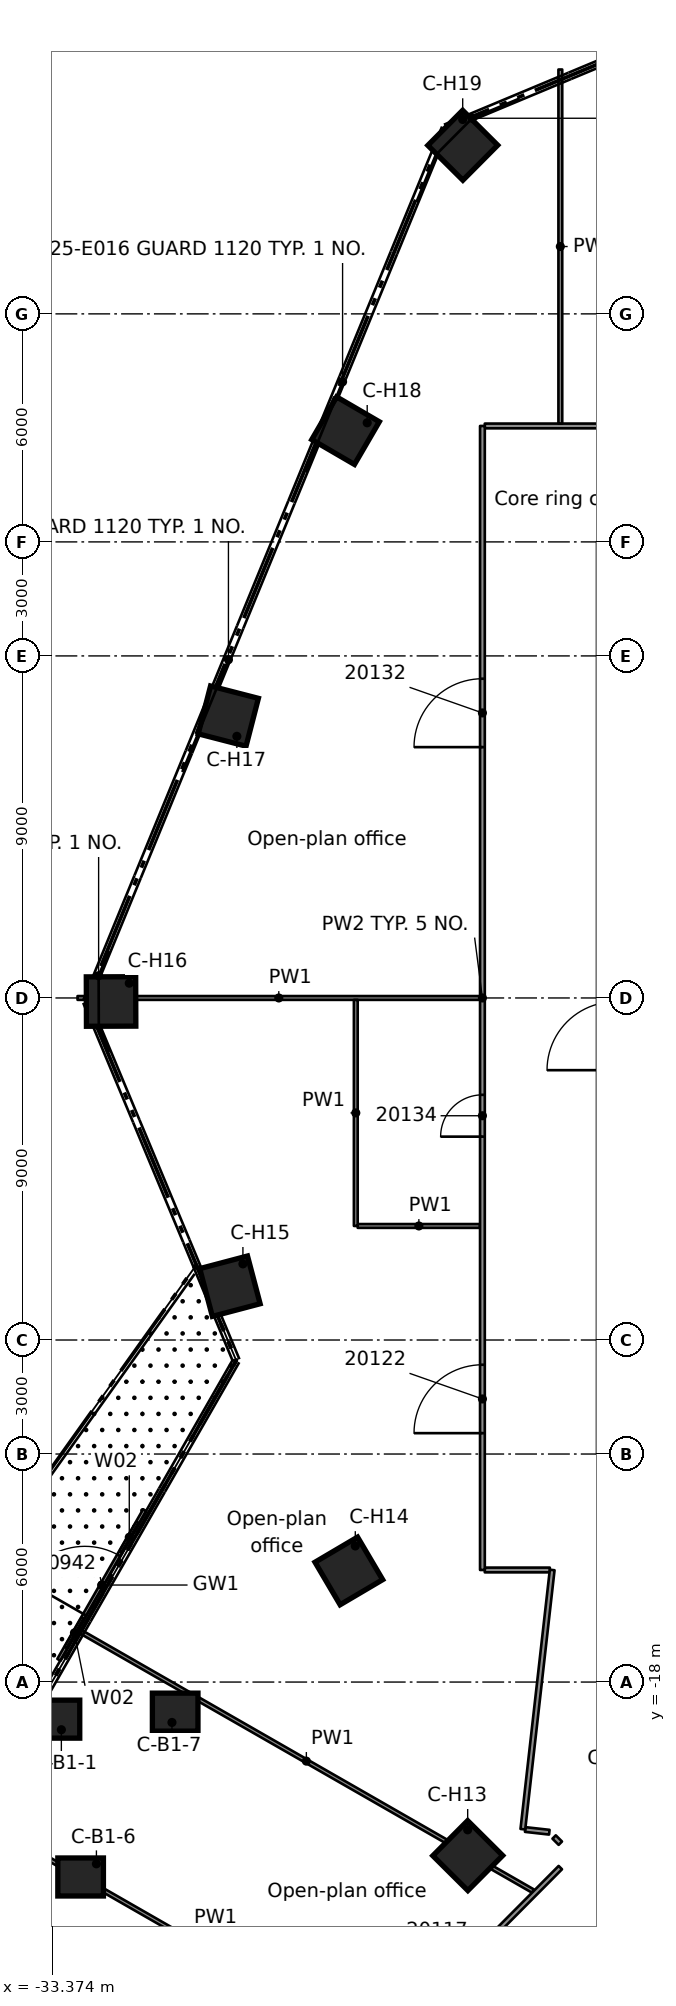
"""IFC4 building model, lengths in metres.
Left out: names, types, materials, properties, quantities, classifications, styles, units other than length and angle.
Written with IfcOpenShell. Run it as: python <this file> out.ifc"""

import sys

from ifc_helpers import new_model, si_unit, direction, frame, frame_2d, origin, origin_2d, place, context, subcontext, project, spatial, rectangle, extrude, element, fill, save


model = new_model("IFC4")
c1 = context("Model", 3, precision=1e-05, world=origin(), true_north=direction((0.0, 1.0)))
c2 = subcontext(c1, "Body", "Model", "MODEL_VIEW")
j1 = project(units=[si_unit("LENGTHUNIT", "METRE"), si_unit("PLANEANGLEUNIT", "RADIAN")], contexts=[c1])
p1 = place(None, origin())
s1 = spatial("IfcSite", under=j1, at=p1, CompositionType="ELEMENT")
p2 = place(p1, origin())
s2 = spatial("IfcBuilding", under=s1, at=p2, CompositionType="ELEMENT")
p3 = place(p2, frame((0.0, 0.0, 102.2)))
s3 = spatial("IfcBuildingStorey", under=s2, at=p3, CompositionType="ELEMENT", Elevation=102.2)
for number, where, z_axis, x_axis in (
    (1, (-33.246, -18.976, 0.0), (0.0, 0.0, 1.0), (1.0, 0.0, 0.0)),
    (2, (-32.623, -23.129, 0.0), (0.0, 0.0, 1.0), (1.0, 0.0, 0.0)),
    (3, (-30.135, -18.792, 0.0), (0.0, 0.0, 1.0), (1.0, 0.0, 0.0)),
):
    element("IfcColumn", number, at=place(p3, frame(where, z_axis=z_axis, x_axis=x_axis)), inside=s3, PredefinedType="COLUMN", context=c2, shape_type="SweptSolid", body=[
        extrude(rectangle(XDim=1.2, YDim=1.0, at=origin_2d()), origin(), (0.0, 0.0, 1.0), 3.5),
    ])
for number, where, z_axis, x_axis in (
    (4, (-22.436, -22.567, 0.0), (0.0, 0.0, 1.0), (-0.705, -0.709, 0.0)),
    (5, (-25.565, -15.076, 0.0), (0.0, 0.0, 1.0), (-0.861, -0.508, 0.0)),
    (6, (-28.694, -7.584, 0.0), (0.0, 0.0, 1.0), (-0.967, -0.256, 0.0)),
    (7, (-31.822, -0.093, 0.0), (0.0, 0.0, 1.0), (-1.0, -0.003, 0.0)),
    (8, (-28.737, 7.417, 0.0), (0.0, 0.0, 1.0), (-0.968, 0.25, 0.0)),
    (9, (-25.652, 14.927, 0.0), (0.0, 0.0, 1.0), (-0.864, 0.503, 0.0)),
    (10, (-22.567, 22.436, 0.0), (0.0, 0.0, 1.0), (-0.709, 0.705, 0.0)),
):
    element("IfcColumn", number, at=place(p3, frame(where, z_axis=z_axis, x_axis=x_axis)), inside=s3, PredefinedType="COLUMN", context=c2, shape_type="SweptSolid", body=[
        extrude(rectangle(XDim=1.3, YDim=1.3, at=origin_2d()), origin(), (0.0, 0.0, 1.0), 3.5),
    ])
p4 = place(p3, frame((-33.193, -17.416, 0.0), z_axis=(0.0, 0.0, 1.0), x_axis=(0.497482354019, 0.86747409612, 0.0)))
e11 = element("IfcWall", 11, at=p4, inside=s3, PredefinedType="STANDARD", context=c2, shape_type="SweptSolid", body=[
    extrude(rectangle(XDim=4.539, YDim=0.1, at=frame_2d((2.269, 0.0))), origin(), (0.0, 0.0, 1.0), 3.1),
])
p5 = place(p4, frame((1.369, 0.0, 0.0)))
e12 = element("IfcOpeningElement", 12, at=p5, cuts=e11, PredefinedType="OPENING", context=c2, shape_type="SweptSolid", body=[
    extrude(rectangle(XDim=1.8, YDim=2.4, at=frame_2d((0.9, 1.2))), frame((0.0, 0.06, 0.0), z_axis=(0.0, -1.0, 0.0), x_axis=(1.0, 0.0, 0.0)), (0.0, 0.0, 1.0), 0.12),
])
p6 = place(p4, frame((0.369, 0.0, 0.0)))
e13 = element("IfcOpeningElement", 13, at=p6, cuts=e11, PredefinedType="OPENING", context=c2, shape_type="SweptSolid", body=[
    extrude(rectangle(XDim=0.9, YDim=2.4, at=frame_2d((0.45, 1.2))), frame((0.0, 0.06, 0.0), z_axis=(0.0, -1.0, 0.0), x_axis=(1.0, 0.0, 0.0)), (0.0, 0.0, 1.0), 0.12),
])
p7 = place(p4, frame((3.269, 0.0, 0.0)))
e14 = element("IfcOpeningElement", 14, at=p7, cuts=e11, PredefinedType="OPENING", context=c2, shape_type="SweptSolid", body=[
    extrude(rectangle(XDim=0.9, YDim=2.4, at=frame_2d((0.45, 1.2))), frame((0.0, 0.06, 0.0), z_axis=(0.0, -1.0, 0.0), x_axis=(1.0, 0.0, 0.0)), (0.0, 0.0, 1.0), 0.12),
])
p8 = place(p3, frame((-20.163, -22.077, 0.0), z_axis=(0.0, 0.0, 1.0), x_axis=(0.707106781187, -0.707106781187, 0.0)))
e15 = element("IfcWall", 15, at=p8, inside=s3, PredefinedType="PARTITIONING", context=c2, shape_type="SweptSolid", body=[
    extrude(rectangle(XDim=0.231, YDim=0.125, at=frame_2d((0.115, 0.0))), origin(), (0.0, 0.0, 1.0), 3.08),
])
p9 = place(p3, frame((-35.624, -21.415, 0.0), z_axis=(0.0, 0.0, 1.0), x_axis=(0.867457713736, -0.497510919358, 0.0)))
e16 = element("IfcWall", 16, at=p9, inside=s3, PredefinedType="PARTITIONING", context=c2, shape_type="SweptSolid", body=[
    extrude(rectangle(XDim=13.523, YDim=0.1, at=frame_2d((6.762, 0.0))), origin(), (0.0, 0.0, 1.0), 3.08),
])
p10 = place(p3, frame((-32.645, -16.662, 0.0), z_axis=(0.0, 0.0, 1.0), x_axis=(0.867516428304, -0.497408530911, 0.0)))
e17 = element("IfcWall", 17, at=p10, inside=s3, PredefinedType="PARTITIONING", context=c2, shape_type="SweptSolid", body=[
    extrude(rectangle(XDim=13.745, YDim=0.1, at=frame_2d((6.873, 0.0))), origin(), (0.0, 0.0, 1.0), 3.08),
])
p11 = place(p3, frame((-20.924, -21.88, 0.0), z_axis=(0.0, 0.0, 1.0), x_axis=(0.993780638981, -0.111355473987, 0.0)))
e18 = element("IfcWall", 18, at=p11, inside=s3, PredefinedType="PARTITIONING", context=c2, shape_type="SweptSolid", body=[
    extrude(rectangle(XDim=0.638, YDim=0.125, at=frame_2d((0.319, 0.0))), origin(), (0.0, 0.0, 1.0), 3.08),
])
p12 = place(p3, frame((-21.988, -15.051, 0.0), z_axis=(0.0, 0.0, 1.0), x_axis=(1.0, 0.0, 0.0)))
e19 = element("IfcWall", 19, at=p12, inside=s3, PredefinedType="PARTITIONING", context=c2, shape_type="SweptSolid", body=[
    extrude(rectangle(XDim=1.712, YDim=0.125, at=frame_2d((0.856, 0.0))), origin(), (0.0, 0.0, 1.0), 3.08),
])
p13 = place(p3, frame((-25.332, -5.999, 0.0), z_axis=(0.0, 0.0, 1.0), x_axis=(1.0, 0.0, 0.0)))
e20 = element("IfcWall", 20, at=p13, inside=s3, PredefinedType="PARTITIONING", context=c2, shape_type="SweptSolid", body=[
    extrude(rectangle(XDim=3.219, YDim=0.1, at=frame_2d((1.609, 0.0))), origin(), (0.0, 0.0, 1.0), 3.08),
])
p14 = place(p3, frame((-32.704, 0.0, 0.0), z_axis=(0.0, 0.0, 1.0), x_axis=(1.0, 0.0, 0.0)))
e21 = element("IfcWall", 21, at=p14, inside=s3, PredefinedType="PARTITIONING", context=c2, shape_type="SweptSolid", body=[
    extrude(rectangle(XDim=10.591, YDim=0.1, at=frame_2d((5.295, 0.0))), origin(), (0.0, 0.0, 1.0), 3.08),
])
p15 = place(p3, frame((-21.988, 15.051, 0.0), z_axis=(0.0, 0.0, 1.0), x_axis=(1.0, 0.0, 0.0)))
e22 = element("IfcWall", 22, at=p15, inside=s3, PredefinedType="PARTITIONING", context=c2, shape_type="SweptSolid", body=[
    extrude(rectangle(XDim=10.997, YDim=0.125, at=frame_2d((5.499, 0.0))), origin(), (0.0, 0.0, 1.0), 3.08),
])
p16 = place(p15, frame((5.587, 0.0, 0.0)))
e23 = element("IfcOpeningElement", 23, at=p16, cuts=e22, PredefinedType="OPENING", context=c2, shape_type="SweptSolid", body=[
    extrude(rectangle(XDim=1.8, YDim=2.1, at=frame_2d((0.9, 1.05))), frame((0.0, 0.073, 0.0), z_axis=(0.0, -1.0, 0.0), x_axis=(1.0, 0.0, 0.0)), (0.0, 0.0, 1.0), 0.145),
])
p17 = place(p3, frame((-20.0, -22.882, 0.0), z_axis=(0.0, 0.0, 1.0), x_axis=(-0.705070089301, -0.709137623578, 0.0)))
e24 = element("IfcWall", 24, at=p17, inside=s3, PredefinedType="PARTITIONING", context=c2, shape_type="SweptSolid", body=[
    extrude(rectangle(XDim=2.641, YDim=0.125, at=frame_2d((1.32, 0.0))), origin(), (0.0, 0.0, 1.0), 3.08),
])
p18 = place(p3, frame((-16.8, -23.128, 0.0), z_axis=(0.0, 0.0, 1.0), x_axis=(-0.496846554385, -0.867838407422, 0.0)))
e25 = element("IfcWall", 25, at=p18, inside=s3, PredefinedType="PARTITIONING", context=c2, shape_type="SweptSolid", body=[
    extrude(rectangle(XDim=21.88, YDim=0.15, at=frame_2d((10.94, 0.0))), origin(), (0.0, 0.0, 1.0), 3.08),
])
p19 = place(p18, frame((4.622, 0.0, 0.0)))
e26 = element("IfcOpeningElement", 26, at=p19, cuts=e25, PredefinedType="OPENING", context=c2, shape_type="SweptSolid", body=[
    extrude(rectangle(XDim=0.9, YDim=2.1, at=frame_2d((0.45, 1.05))), frame((0.0, 0.085, 0.0), z_axis=(0.0, -1.0, 0.0), x_axis=(1.0, 0.0, 0.0)), (0.0, 0.0, 1.0), 0.17),
])
p20 = place(p3, frame((-20.986, -21.872, 0.0), z_axis=(0.0, 0.0, 1.0), x_axis=(0.112457212795, 0.993656568081, 0.0)))
e27 = element("IfcWall", 27, at=p20, inside=s3, PredefinedType="PARTITIONING", context=c2, shape_type="SweptSolid", body=[
    extrude(rectangle(XDim=6.865, YDim=0.125, at=frame_2d((3.432, 0.0))), origin(), (0.0, 0.0, 1.0), 3.08),
])
p21 = place(p3, frame((-20.0, 15.114, 0.0), z_axis=(0.0, 0.0, 1.0), x_axis=(0.0, 1.0, 0.0)))
e28 = element("IfcWall", 28, at=p21, inside=s3, PredefinedType="PARTITIONING", context=c2, shape_type="SweptSolid", body=[
    extrude(rectangle(XDim=9.316, YDim=0.1, at=frame_2d((4.658, 0.0))), origin(), (0.0, 0.0, 1.0), 3.08),
])
p22 = place(p3, frame((-22.05, -15.051, 0.0), z_axis=(0.0, 0.0, 1.0), x_axis=(0.0, 1.0, 0.0)))
e29 = element("IfcWall", 29, at=p22, inside=s3, PredefinedType="PARTITIONING", context=c2, shape_type="SweptSolid", body=[
    extrude(rectangle(XDim=30.102, YDim=0.125, at=frame_2d((15.051, 0.0))), origin(), (0.0, 0.0, 1.0), 3.08),
])
p23 = place(p22, frame((3.6, 0.0, 0.0)))
e30 = element("IfcOpeningElement", 30, at=p23, cuts=e29, PredefinedType="OPENING", context=c2, shape_type="SweptSolid", body=[
    extrude(rectangle(XDim=1.8, YDim=2.1, at=frame_2d((0.9, 1.05))), frame((0.0, 0.073, 0.0), z_axis=(0.0, -1.0, 0.0), x_axis=(1.0, 0.0, 0.0)), (0.0, 0.0, 1.0), 0.145),
])
p24 = place(p22, frame((21.651, 0.0, 0.0)))
e31 = element("IfcOpeningElement", 31, at=p24, cuts=e29, PredefinedType="OPENING", context=c2, shape_type="SweptSolid", body=[
    extrude(rectangle(XDim=1.8, YDim=2.1, at=frame_2d((0.9, 1.05))), frame((0.0, 0.073, 0.0), z_axis=(0.0, -1.0, 0.0), x_axis=(1.0, 0.0, 0.0)), (0.0, 0.0, 1.0), 0.145),
])
p25 = place(p22, frame((11.402, 0.0, 0.0)))
e32 = element("IfcOpeningElement", 32, at=p25, cuts=e29, PredefinedType="OPENING", context=c2, shape_type="SweptSolid", body=[
    extrude(rectangle(XDim=1.1, YDim=2.1, at=frame_2d((0.55, 1.05))), frame((0.0, 0.073, 0.0), z_axis=(0.0, -1.0, 0.0), x_axis=(1.0, 0.0, 0.0)), (0.0, 0.0, 1.0), 0.145),
])
p26 = place(p3, frame((-25.382, -5.999, 0.0), z_axis=(0.0, 0.0, 1.0), x_axis=(0.0, 1.0, 0.0)))
e33 = element("IfcWall", 33, at=p26, inside=s3, PredefinedType="PARTITIONING", context=c2, shape_type="SweptSolid", body=[
    extrude(rectangle(XDim=5.949, YDim=0.1, at=frame_2d((2.975, 0.0))), origin(), (0.0, 0.0, 1.0), 3.08),
])
p27 = place(p5, origin())
e34 = element("IfcDoor", 34, at=p27, inside=s3, OperationType="DOUBLE_DOOR_SINGLE_SWING", PredefinedType="DOOR", context=c2, shape_type="SweptSolid", body=[
    extrude(rectangle(XDim=1.8, YDim=2.4, at=frame_2d((0.9, 1.2))), frame((0.0, 0.025, 0.0), z_axis=(0.0, -1.0, 0.0), x_axis=(1.0, 0.0, 0.0)), (0.0, 0.0, 1.0), 0.05),
])
fill(e12, e34)
p28 = place(p6, origin())
e35 = element("IfcWindow", 35, at=p28, inside=s3, PartitioningType="SINGLE_PANEL", PredefinedType="WINDOW", context=c2, shape_type="SweptSolid", body=[
    extrude(rectangle(XDim=0.9, YDim=2.4, at=frame_2d((0.45, 1.2))), frame((0.0, 0.03, 0.0), z_axis=(0.0, -1.0, 0.0), x_axis=(1.0, 0.0, 0.0)), (0.0, 0.0, 1.0), 0.06),
])
fill(e13, e35)
p29 = place(p7, origin())
e36 = element("IfcWindow", 36, at=p29, inside=s3, PartitioningType="SINGLE_PANEL", PredefinedType="WINDOW", context=c2, shape_type="SweptSolid", body=[
    extrude(rectangle(XDim=0.9, YDim=2.4, at=frame_2d((0.45, 1.2))), frame((0.0, 0.03, 0.0), z_axis=(0.0, -1.0, 0.0), x_axis=(1.0, 0.0, 0.0)), (0.0, 0.0, 1.0), 0.06),
])
fill(e14, e36)
p30 = place(p23, origin())
e37 = element("IfcDoor", 37, at=p30, inside=s3, OperationType="DOUBLE_DOOR_SINGLE_SWING", PredefinedType="DOOR", context=c2, shape_type="SweptSolid", body=[
    extrude(rectangle(XDim=1.8, YDim=2.1, at=frame_2d((0.9, 1.05))), frame((0.0, 0.025, 0.0), z_axis=(0.0, -1.0, 0.0), x_axis=(1.0, 0.0, 0.0)), (0.0, 0.0, 1.0), 0.05),
])
fill(e30, e37)
p31 = place(p24, origin())
e38 = element("IfcDoor", 38, at=p31, inside=s3, OperationType="DOUBLE_DOOR_SINGLE_SWING", PredefinedType="DOOR", context=c2, shape_type="SweptSolid", body=[
    extrude(rectangle(XDim=1.8, YDim=2.1, at=frame_2d((0.9, 1.05))), frame((0.0, 0.025, 0.0), z_axis=(0.0, -1.0, 0.0), x_axis=(1.0, 0.0, 0.0)), (0.0, 0.0, 1.0), 0.05),
])
fill(e31, e38)
p32 = place(p25, origin())
e39 = element("IfcDoor", 39, at=p32, inside=s3, OperationType="SINGLE_SWING_LEFT", PredefinedType="DOOR", context=c2, shape_type="SweptSolid", body=[
    extrude(rectangle(XDim=1.1, YDim=2.1, at=frame_2d((0.55, 1.05))), frame((0.0, 0.025, 0.0), z_axis=(0.0, -1.0, 0.0), x_axis=(1.0, 0.0, 0.0)), (0.0, 0.0, 1.0), 0.05),
])
fill(e32, e39)
save(model, sys.argv[1])
